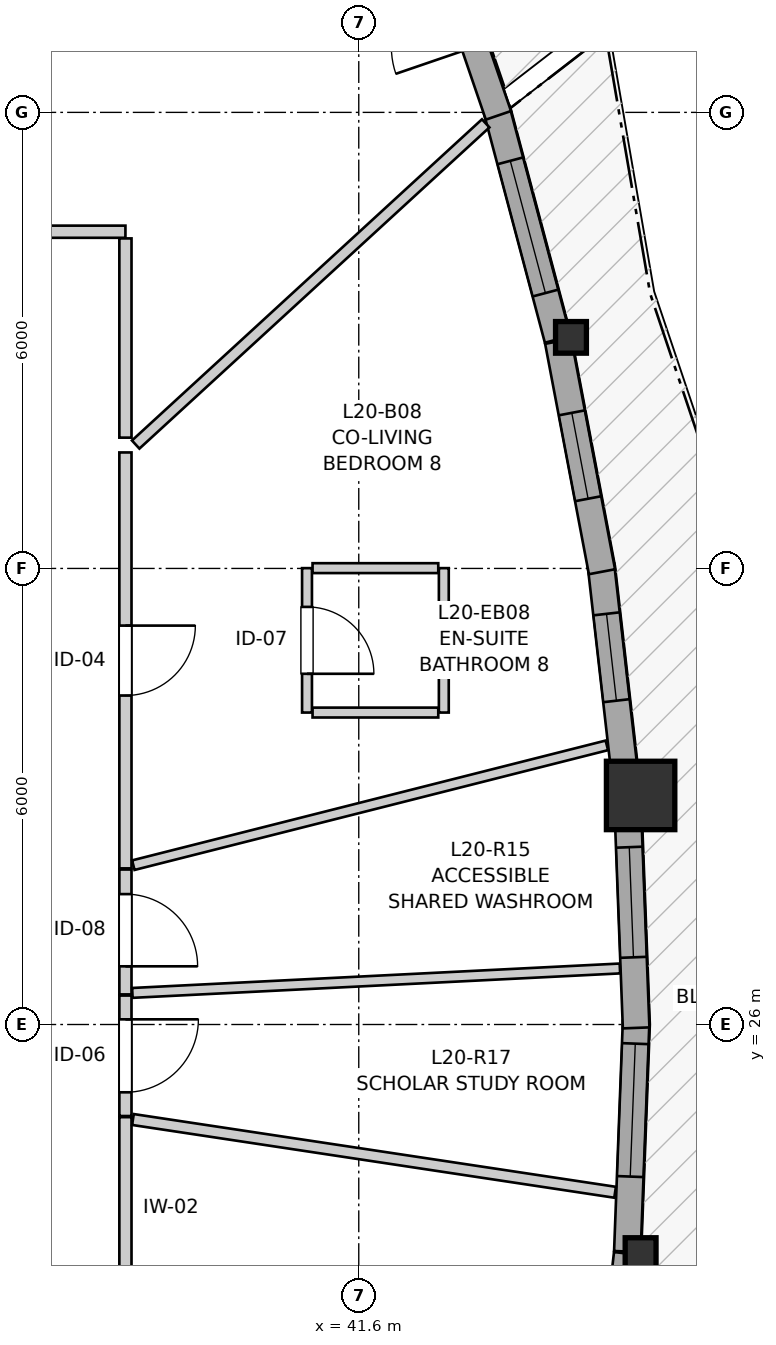
"""IFC4 building model, lengths in metres.
Left out: names, types, materials, properties, quantities, classifications, styles, units other than length and angle.
Written with IfcOpenShell. Run it as: python <this file> out.ifc"""

import sys

from ifc_helpers import new_model, si_unit, direction, frame, frame_2d, origin, origin_2d, place, context, subcontext, project, spatial, rectangle, i_section, extrude, source, transform, mapped, element, fill, save


model = new_model("IFC4")
c1 = context("Model", 3, precision=1e-05, world=origin(), true_north=direction((0.0, 1.0)))
c2 = subcontext(c1, "Body", "Model", "MODEL_VIEW")
j1 = project(units=[si_unit("LENGTHUNIT", "METRE"), si_unit("PLANEANGLEUNIT", "RADIAN")], contexts=[c1])
p1 = place(None, origin())
s1 = spatial("IfcSite", under=j1, at=p1, CompositionType="ELEMENT")
p2 = place(p1, origin())
s2 = spatial("IfcBuilding", under=s1, at=p2, CompositionType="ELEMENT")
p3 = place(p2, frame((0.0, 0.0, 70.4)))
s3 = spatial("IfcBuildingStorey", under=s2, at=p3, CompositionType="ELEMENT", Elevation=70.4)
m1 = source(origin(), c2, "Body", "SweptSolid", [
    extrude(i_section(OverallWidth=0.406, OverallDepth=0.416, WebThickness=0.027, FlangeThickness=0.044, FilletRadius=0.015, at=origin_2d()), origin(), (0.0, 0.0, 1.0), 2.95),
])
p4 = place(p3, frame((45.308, 22.987, 0.0), z_axis=(0.0, 0.0, 1.0), x_axis=(1.0, 0.0, 0.0)))
e1 = element("IfcColumn", 1, at=p4, inside=s3, PredefinedType="PILASTER", context=c2, shape_type="MappedRepresentation", body=[
    mapped(m1, transform((0.0, 0.0, 0.0), x_axis=(1.0, 0.0, 0.0), y_axis=(0.0, 1.0, 0.0), z_axis=(0.0, 0.0, 1.0), scale=1.0)),
])
m2 = source(origin(), c2, "Body", "SweptSolid", [
    extrude(rectangle(XDim=0.9, YDim=0.9, at=origin_2d()), origin(), (0.0, 0.0, 1.0), 2.95),
])
p5 = place(p3, frame((45.308, 29.013, 0.0), z_axis=(0.0, 0.0, 1.0), x_axis=(1.0, 0.0, 0.0)))
e2 = element("IfcColumn", 2, at=p5, inside=s3, PredefinedType="COLUMN", context=c2, shape_type="MappedRepresentation", body=[
    mapped(m2, transform((0.0, 0.0, 0.0), x_axis=(1.0, 0.0, 0.0), y_axis=(0.0, 1.0, 0.0), z_axis=(0.0, 0.0, 1.0), scale=1.0)),
])
p6 = place(p3, frame((44.392, 35.04, 0.0), z_axis=(0.0, 0.0, 1.0), x_axis=(1.0, 0.0, 0.0)))
e3 = element("IfcColumn", 3, at=p6, inside=s3, PredefinedType="PILASTER", context=c2, shape_type="MappedRepresentation", body=[
    mapped(m1, transform((0.0, 0.0, 0.0), x_axis=(1.0, 0.0, 0.0), y_axis=(0.0, 1.0, 0.0), z_axis=(0.0, 0.0, 1.0), scale=1.0)),
])
p7 = place(p3, frame((44.787, 19.955, 0.0), z_axis=(0.0, 0.0, 1.0), x_axis=(0.113232876367, 0.993568475602, 0.0)))
e4 = element("IfcWall", 4, at=p7, inside=s3, PredefinedType="SOLIDWALL", context=c2, shape_type="SweptSolid", body=[
    extrude(rectangle(XDim=3.051, YDim=0.35, at=frame_2d((1.525, 0.0))), origin(), (0.0, 0.0, 1.0), 2.48),
])
p8 = place(p7, frame((1.06, 0.0, 0.82)))
e5 = element("IfcOpeningElement", 5, at=p8, cuts=e4, PredefinedType="OPENING", context=c2, shape_type="SweptSolid", body=[
    extrude(rectangle(XDim=0.95, YDim=1.35, at=frame_2d((0.475, 0.675))), frame((0.0, 0.185, 0.0), z_axis=(0.0, -1.0, 0.0), x_axis=(1.0, 0.0, 0.0)), (0.0, 0.0, 1.0), 0.37),
])
p9 = place(p3, frame((45.134, 23.013, 0.0), z_axis=(0.0, 0.0, 1.0), x_axis=(0.037984969205, 0.999278310639, 0.0)))
e6 = element("IfcWall", 6, at=p9, inside=s3, PredefinedType="SOLIDWALL", context=c2, shape_type="SweptSolid", body=[
    extrude(rectangle(XDim=3.034, YDim=0.35, at=frame_2d((1.517, 0.0))), origin(), (0.0, 0.0, 1.0), 2.48),
])
p10 = place(p9, frame((0.987, 0.0, 0.82)))
e7 = element("IfcOpeningElement", 7, at=p10, cuts=e6, PredefinedType="OPENING", context=c2, shape_type="SweptSolid", body=[
    extrude(rectangle(XDim=1.75, YDim=1.3, at=frame_2d((0.875, 0.65))), frame((0.0, 0.185, 0.0), z_axis=(0.0, -1.0, 0.0), x_axis=(1.0, 0.0, 0.0)), (0.0, 0.0, 1.0), 0.37),
])
p11 = place(p3, frame((45.249, 25.955, 0.0), z_axis=(0.0, 0.0, 1.0), x_axis=(-0.0379756963, 0.999278663082, 0.0)))
e8 = element("IfcWall", 8, at=p11, inside=s3, PredefinedType="SOLIDWALL", context=c2, shape_type="SweptSolid", body=[
    extrude(rectangle(XDim=2.829, YDim=0.35, at=frame_2d((1.414, 0.0))), origin(), (0.0, 0.0, 1.0), 2.48),
])
p12 = place(p11, frame((0.929, 0.0, 0.82)))
e9 = element("IfcOpeningElement", 9, at=p12, cuts=e8, PredefinedType="OPENING", context=c2, shape_type="SweptSolid", body=[
    extrude(rectangle(XDim=1.45, YDim=1.25, at=frame_2d((0.725, 0.625))), frame((0.0, 0.185, 0.0), z_axis=(0.0, -1.0, 0.0), x_axis=(1.0, 0.0, 0.0)), (0.0, 0.0, 1.0), 0.37),
])
p13 = place(p3, frame((45.109, 29.217, 0.0), z_axis=(0.0, 0.0, 1.0), x_axis=(-0.11323690057, 0.993568016972, 0.0)))
e10 = element("IfcWall", 10, at=p13, inside=s3, PredefinedType="SOLIDWALL", context=c2, shape_type="SweptSolid", body=[
    extrude(rectangle(XDim=2.846, YDim=0.35, at=frame_2d((1.423, 0.0))), origin(), (0.0, 0.0, 1.0), 2.48),
])
p14 = place(p13, frame((1.05, 0.0, 0.82)))
e11 = element("IfcOpeningElement", 11, at=p14, cuts=e10, PredefinedType="OPENING", context=c2, shape_type="SweptSolid", body=[
    extrude(rectangle(XDim=1.15, YDim=1.2, at=frame_2d((0.575, 0.6))), frame((0.0, 0.185, 0.0), z_axis=(0.0, -1.0, 0.0), x_axis=(1.0, 0.0, 0.0)), (0.0, 0.0, 1.0), 0.37),
])
p15 = place(p3, frame((44.8, 31.957, 0.0), z_axis=(0.0, 0.0, 1.0), x_axis=(-0.186672102023, 0.982422274954, 0.0)))
e12 = element("IfcWall", 12, at=p15, inside=s3, PredefinedType="SOLIDWALL", context=c2, shape_type="SweptSolid", body=[
    extrude(rectangle(XDim=3.085, YDim=0.35, at=frame_2d((1.542, 0.0))), origin(), (0.0, 0.0, 1.0), 2.48),
])
p16 = place(p15, frame((0.978, 0.0, 0.82)))
e13 = element("IfcOpeningElement", 13, at=p16, cuts=e12, PredefinedType="OPENING", context=c2, shape_type="SweptSolid", body=[
    extrude(rectangle(XDim=1.15, YDim=1.2, at=frame_2d((0.575, 0.6))), frame((0.0, 0.185, 0.0), z_axis=(0.0, -1.0, 0.0), x_axis=(1.0, 0.0, 0.0)), (0.0, 0.0, 1.0), 0.37),
])
p17 = place(p3, frame((44.218, 35.014, 0.0), z_axis=(0.0, 0.0, 1.0), x_axis=(-0.25705209467, 0.96639754792, 0.0)))
e14 = element("IfcWall", 14, at=p17, inside=s3, PredefinedType="SOLIDWALL", context=c2, shape_type="SweptSolid", body=[
    extrude(rectangle(XDim=3.136, YDim=0.35, at=frame_2d((1.568, 0.0))), origin(), (0.0, 0.0, 1.0), 2.48),
])
p18 = place(p17, frame((0.63, 0.0, 0.82)))
e15 = element("IfcOpeningElement", 15, at=p18, cuts=e14, PredefinedType="OPENING", context=c2, shape_type="SweptSolid", body=[
    extrude(rectangle(XDim=1.8, YDim=1.45, at=frame_2d((0.9, 0.725))), frame((0.0, 0.185, 0.0), z_axis=(0.0, -1.0, 0.0), x_axis=(1.0, 0.0, 0.0)), (0.0, 0.0, 1.0), 0.37),
])
p19 = place(p3, frame((43.437, 37.961, 0.0), z_axis=(0.0, 0.0, 1.0), x_axis=(-0.323572555921, 0.946203361363, 0.0)))
e16 = element("IfcWall", 16, at=p19, inside=s3, PredefinedType="SOLIDWALL", context=c2, shape_type="SweptSolid", body=[
    extrude(rectangle(XDim=2.998, YDim=0.35, at=frame_2d((1.499, 0.0))), origin(), (0.0, 0.0, 1.0), 2.48),
])
p20 = place(p19, frame((0.954, 0.0, 0.0)))
e17 = element("IfcOpeningElement", 17, at=p20, cuts=e16, PredefinedType="OPENING", context=c2, shape_type="SweptSolid", body=[
    extrude(rectangle(XDim=1.1, YDim=2.1, at=frame_2d((0.55, 1.05))), frame((0.0, 0.185, 0.0), z_axis=(0.0, -1.0, 0.0), x_axis=(1.0, 0.0, 0.0)), (0.0, 0.0, 1.0), 0.37),
])
p21 = place(p3, frame((38.53, 24.781, 0.0), z_axis=(0.0, 0.0, 1.0), x_axis=(0.0, -1.0, 0.0)))
e18 = element("IfcWall", 18, at=p21, inside=s3, PredefinedType="PARTITIONING", context=c2, shape_type="SweptSolid", body=[
    extrude(rectangle(XDim=7.203, YDim=0.16, at=frame_2d((3.602, 0.0))), origin(), (0.0, 0.0, 1.0), 2.95),
])
p22 = place(p21, frame((3.119, 0.0, 0.0)))
e19 = element("IfcOpeningElement", 19, at=p22, cuts=e18, PredefinedType="OPENING", context=c2, shape_type="SweptSolid", body=[
    extrude(rectangle(XDim=0.96, YDim=2.1, at=frame_2d((0.48, 1.05))), frame((0.0, 0.09, 0.0), z_axis=(0.0, -1.0, 0.0), x_axis=(1.0, 0.0, 0.0)), (0.0, 0.0, 1.0), 0.18),
])
p23 = place(p3, frame((38.53, 33.526, 0.0), z_axis=(0.0, 0.0, 1.0), x_axis=(0.0, -1.0, 0.0)))
e20 = element("IfcWall", 20, at=p23, inside=s3, PredefinedType="PARTITIONING", context=c2, shape_type="SweptSolid", body=[
    extrude(rectangle(XDim=5.472, YDim=0.16, at=frame_2d((2.736, 0.0))), origin(), (0.0, 0.0, 1.0), 2.95),
])
p24 = place(p23, frame((2.278, 0.0, 0.0)))
e21 = element("IfcOpeningElement", 21, at=p24, cuts=e20, PredefinedType="OPENING", context=c2, shape_type="SweptSolid", body=[
    extrude(rectangle(XDim=0.92, YDim=2.1, at=frame_2d((0.46, 1.05))), frame((0.0, 0.09, 0.0), z_axis=(0.0, -1.0, 0.0), x_axis=(1.0, 0.0, 0.0)), (0.0, 0.0, 1.0), 0.18),
])
p25 = place(p3, frame((34.909, 36.43, 0.0), z_axis=(0.0, 0.0, 1.0), x_axis=(1.0, 0.0, 0.0)))
e22 = element("IfcWall", 22, at=p25, inside=s3, PredefinedType="PARTITIONING", context=c2, shape_type="SweptSolid", body=[
    extrude(rectangle(XDim=3.621, YDim=0.16, at=frame_2d((1.811, 0.0))), origin(), (0.0, 0.0, 1.0), 2.588),
])
p26 = place(p25, frame((1.339, 0.0, 0.0)))
e23 = element("IfcOpeningElement", 23, at=p26, cuts=e22, PredefinedType="OPENING", context=c2, shape_type="SweptSolid", body=[
    extrude(rectangle(XDim=0.96, YDim=2.1, at=frame_2d((0.48, 1.05))), frame((0.0, 0.09, 0.0), z_axis=(0.0, -1.0, 0.0), x_axis=(1.0, 0.0, 0.0)), (0.0, 0.0, 1.0), 0.18),
])
p27 = place(p3, frame((40.919, 32.004, 0.0), z_axis=(0.0, 0.0, 1.0), x_axis=(0.0, -1.0, 0.0)))
e24 = element("IfcWall", 24, at=p27, inside=s3, PredefinedType="PARTITIONING", context=c2, shape_type="SweptSolid", body=[
    extrude(rectangle(XDim=1.9, YDim=0.13, at=frame_2d((0.95, 0.0))), origin(), (0.0, 0.0, 1.0), 2.95),
])
p28 = place(p27, frame((0.51, 0.0, 0.0)))
e25 = element("IfcOpeningElement", 25, at=p28, cuts=e24, PredefinedType="OPENING", context=c2, shape_type="SweptSolid", body=[
    extrude(rectangle(XDim=0.88, YDim=2.05, at=frame_2d((0.44, 1.025))), frame((0.0, 0.075, 0.0), z_axis=(0.0, -1.0, 0.0), x_axis=(1.0, 0.0, 0.0)), (0.0, 0.0, 1.0), 0.15),
])
p29 = place(p3, frame((38.53, 28.039, 0.0), z_axis=(0.0, 0.0, 1.0), x_axis=(0.0, -1.0, 0.0)))
e26 = element("IfcWall", 26, at=p29, inside=s3, PredefinedType="PARTITIONING", context=c2, shape_type="SweptSolid", body=[
    extrude(rectangle(XDim=1.643, YDim=0.16, at=frame_2d((0.822, 0.0))), origin(), (0.0, 0.0, 1.0), 2.95),
])
p30 = place(p29, frame((0.323, 0.0, 0.0)))
e27 = element("IfcOpeningElement", 27, at=p30, cuts=e26, PredefinedType="OPENING", context=c2, shape_type="SweptSolid", body=[
    extrude(rectangle(XDim=0.95, YDim=2.1, at=frame_2d((0.475, 1.05))), frame((0.0, 0.09, 0.0), z_axis=(0.0, -1.0, 0.0), x_axis=(1.0, 0.0, 0.0)), (0.0, 0.0, 1.0), 0.18),
])
p31 = place(p3, frame((38.53, 26.381, 0.0), z_axis=(0.0, 0.0, 1.0), x_axis=(0.0, -1.0, 0.0)))
e28 = element("IfcWall", 28, at=p31, inside=s3, PredefinedType="PARTITIONING", context=c2, shape_type="SweptSolid", body=[
    extrude(rectangle(XDim=1.585, YDim=0.16, at=frame_2d((0.792, 0.0))), origin(), (0.0, 0.0, 1.0), 2.95),
])
p32 = place(p31, frame((0.313, 0.0, 0.0)))
e29 = element("IfcOpeningElement", 29, at=p32, cuts=e28, PredefinedType="OPENING", context=c2, shape_type="SweptSolid", body=[
    extrude(rectangle(XDim=0.96, YDim=2.1, at=frame_2d((0.48, 1.05))), frame((0.0, 0.09, 0.0), z_axis=(0.0, -1.0, 0.0), x_axis=(1.0, 0.0, 0.0)), (0.0, 0.0, 1.0), 0.18),
])
p33 = place(p3, frame((34.977, 36.546, 0.0), z_axis=(0.0, 0.0, 1.0), x_axis=(0.40175384449, 0.915747699117, 0.0)))
e30 = element("IfcWall", 30, at=p33, inside=s3, PredefinedType="PARTITIONING", context=c2, shape_type="SweptSolid", body=[
    extrude(rectangle(XDim=10.23, YDim=0.145, at=frame_2d((5.115, 0.0))), origin(), (0.0, 0.0, 1.0), 2.95),
])
p34 = place(p3, frame((38.634, 28.096, 0.0), z_axis=(0.0, 0.0, 1.0), x_axis=(0.969457090906, 0.245260981186, 0.0)))
e31 = element("IfcWall", 31, at=p34, inside=s3, PredefinedType="PARTITIONING", context=c2, shape_type="SweptSolid", body=[
    extrude(rectangle(XDim=6.427, YDim=0.13, at=frame_2d((3.213, 0.0))), origin(), (0.0, 0.0, 1.0), 2.95),
])
p35 = place(p3, frame((38.629, 24.75, 0.0), z_axis=(0.0, 0.0, 1.0), x_axis=(0.988806184902, -0.149205659073, 0.0)))
e32 = element("IfcWall", 32, at=p35, inside=s3, PredefinedType="PARTITIONING", context=c2, shape_type="SweptSolid", body=[
    extrude(rectangle(XDim=6.416, YDim=0.145, at=frame_2d((3.208, 0.0))), origin(), (0.0, 0.0, 1.0), 2.95),
])
p36 = place(p3, frame((38.621, 26.416, 0.0), z_axis=(0.0, 0.0, 1.0), x_axis=(0.998746074583, 0.050062745689, 0.0)))
e33 = element("IfcWall", 33, at=p36, inside=s3, PredefinedType="PARTITIONING", context=c2, shape_type="SweptSolid", body=[
    extrude(rectangle(XDim=6.423, YDim=0.13, at=frame_2d((3.211, 0.0))), origin(), (0.0, 0.0, 1.0), 2.95),
])
p37 = place(p3, frame((38.665, 33.63, 0.0), z_axis=(0.0, 0.0, 1.0), x_axis=(0.736824900837, 0.676083623161, 0.0)))
e34 = element("IfcWall", 34, at=p37, inside=s3, PredefinedType="PARTITIONING", context=c2, shape_type="SweptSolid", body=[
    extrude(rectangle(XDim=6.25, YDim=0.145, at=frame_2d((3.125, 0.0))), origin(), (0.0, 0.0, 1.0), 2.95),
])
p38 = place(p3, frame((38.53, 33.721, 0.0), z_axis=(0.0, 0.0, 1.0), x_axis=(0.0, 1.0, 0.0)))
e35 = element("IfcWall", 35, at=p38, inside=s3, PredefinedType="PARTITIONING", context=c2, shape_type="SweptSolid", body=[
    extrude(rectangle(XDim=2.621, YDim=0.16, at=frame_2d((1.311, 0.0))), origin(), (0.0, 0.0, 1.0), 2.588),
])
p39 = place(p3, frame((42.719, 30.104, 0.0), z_axis=(0.0, 0.0, 1.0), x_axis=(0.0, 1.0, 0.0)))
e36 = element("IfcWall", 36, at=p39, inside=s3, PredefinedType="PARTITIONING", context=c2, shape_type="SweptSolid", body=[
    extrude(rectangle(XDim=1.9, YDim=0.13, at=frame_2d((0.95, 0.0))), origin(), (0.0, 0.0, 1.0), 2.95),
])
for number, where, z_axis, x_axis in (
    (37, (40.992, 32.004, 0.0), (0.0, 0.0, 1.0), (1.0, 0.0, 0.0)),
    (38, (40.992, 30.104, 0.0), (0.0, 0.0, 1.0), (1.0, 0.0, 0.0)),
):
    element("IfcWall", number, at=place(p3, frame(where, z_axis=z_axis, x_axis=x_axis)), inside=s3, PredefinedType="PARTITIONING", context=c2, shape_type="SweptSolid", body=[
        extrude(rectangle(XDim=1.654, YDim=0.13, at=frame_2d((0.827, 0.0))), origin(), (0.0, 0.0, 1.0), 2.95),
    ])
m3 = source(origin(), c2, "Body", "SweptSolid", [
    extrude(rectangle(XDim=1.75, YDim=1.3, at=frame_2d((0.875, 0.65))), frame((0.0, 0.03, 0.0), z_axis=(0.0, -1.0, 0.0), x_axis=(1.0, 0.0, 0.0)), (0.0, 0.0, 1.0), 0.06),
])
p40 = place(p10, origin())
e39 = element("IfcWindow", 39, at=p40, inside=s3, PartitioningType="SINGLE_PANEL", PredefinedType="WINDOW", context=c2, shape_type="MappedRepresentation", body=[
    mapped(m3, transform((0.0, 0.0, 0.0), x_axis=(1.0, 0.0, 0.0), y_axis=(0.0, 1.0, 0.0), z_axis=(0.0, 0.0, 1.0), scale=1.0)),
])
fill(e7, e39)
m4 = source(origin(), c2, "Body", "SweptSolid", [
    extrude(rectangle(XDim=1.45, YDim=1.25, at=frame_2d((0.725, 0.625))), frame((0.0, 0.03, 0.0), z_axis=(0.0, -1.0, 0.0), x_axis=(1.0, 0.0, 0.0)), (0.0, 0.0, 1.0), 0.06),
])
p41 = place(p12, origin())
e40 = element("IfcWindow", 40, at=p41, inside=s3, PartitioningType="SINGLE_PANEL", PredefinedType="WINDOW", context=c2, shape_type="MappedRepresentation", body=[
    mapped(m4, transform((0.0, 0.0, 0.0), x_axis=(1.0, 0.0, 0.0), y_axis=(0.0, 1.0, 0.0), z_axis=(0.0, 0.0, 1.0), scale=1.0)),
])
fill(e9, e40)
m5 = source(origin(), c2, "Body", "SweptSolid", [
    extrude(rectangle(XDim=1.15, YDim=1.2, at=frame_2d((0.575, 0.6))), frame((0.0, 0.03, 0.0), z_axis=(0.0, -1.0, 0.0), x_axis=(1.0, 0.0, 0.0)), (0.0, 0.0, 1.0), 0.06),
])
p42 = place(p14, origin())
e41 = element("IfcWindow", 41, at=p42, inside=s3, PartitioningType="SINGLE_PANEL", PredefinedType="WINDOW", context=c2, shape_type="MappedRepresentation", body=[
    mapped(m5, transform((0.0, 0.0, 0.0), x_axis=(1.0, 0.0, 0.0), y_axis=(0.0, 1.0, 0.0), z_axis=(0.0, 0.0, 1.0), scale=1.0)),
])
fill(e11, e41)
p43 = place(p16, origin())
e42 = element("IfcWindow", 42, at=p43, inside=s3, PartitioningType="SINGLE_PANEL", PredefinedType="WINDOW", context=c2, shape_type="MappedRepresentation", body=[
    mapped(m5, transform((0.0, 0.0, 0.0), x_axis=(1.0, 0.0, 0.0), y_axis=(0.0, 1.0, 0.0), z_axis=(0.0, 0.0, 1.0), scale=1.0)),
])
fill(e13, e42)
m6 = source(origin(), c2, "Body", "SweptSolid", [
    extrude(rectangle(XDim=1.8, YDim=1.45, at=frame_2d((0.9, 0.725))), frame((0.0, 0.03, 0.0), z_axis=(0.0, -1.0, 0.0), x_axis=(1.0, 0.0, 0.0)), (0.0, 0.0, 1.0), 0.06),
])
p44 = place(p18, origin())
e43 = element("IfcWindow", 43, at=p44, inside=s3, PartitioningType="SINGLE_PANEL", PredefinedType="WINDOW", context=c2, shape_type="MappedRepresentation", body=[
    mapped(m6, transform((0.0, 0.0, 0.0), x_axis=(1.0, 0.0, 0.0), y_axis=(0.0, 1.0, 0.0), z_axis=(0.0, 0.0, 1.0), scale=1.0)),
])
fill(e15, e43)
m7 = source(origin(), c2, "Body", "SweptSolid", [
    extrude(rectangle(XDim=0.92, YDim=2.1, at=frame_2d((0.46, 1.05))), frame((0.0, 0.025, 0.0), z_axis=(0.0, -1.0, 0.0), x_axis=(1.0, 0.0, 0.0)), (0.0, 0.0, 1.0), 0.05),
])
p45 = place(p24, origin())
e44 = element("IfcDoor", 44, at=p45, inside=s3, OperationType="SINGLE_SWING_LEFT", PredefinedType="DOOR", context=c2, shape_type="MappedRepresentation", body=[
    mapped(m7, transform((0.0, 0.0, 0.0), x_axis=(1.0, 0.0, 0.0), y_axis=(0.0, 1.0, 0.0), z_axis=(0.0, 0.0, 1.0), scale=1.0)),
])
fill(e21, e44)
m8 = source(origin(), c2, "Body", "SweptSolid", [
    extrude(rectangle(XDim=0.88, YDim=2.05, at=frame_2d((0.44, 1.025))), frame((0.0, 0.025, 0.0), z_axis=(0.0, -1.0, 0.0), x_axis=(1.0, 0.0, 0.0)), (0.0, 0.0, 1.0), 0.05),
])
p46 = place(p28, origin())
e45 = element("IfcDoor", 45, at=p46, inside=s3, OperationType="SINGLE_SWING_RIGHT", PredefinedType="DOOR", context=c2, shape_type="MappedRepresentation", body=[
    mapped(m8, transform((0.0, 0.0, 0.0), x_axis=(1.0, 0.0, 0.0), y_axis=(0.0, 1.0, 0.0), z_axis=(0.0, 0.0, 1.0), scale=1.0)),
])
fill(e25, e45)
m9 = source(origin(), c2, "Body", "SweptSolid", [
    extrude(rectangle(XDim=0.95, YDim=2.1, at=frame_2d((0.475, 1.05))), frame((0.0, 0.025, 0.0), z_axis=(0.0, -1.0, 0.0), x_axis=(1.0, 0.0, 0.0)), (0.0, 0.0, 1.0), 0.05),
])
p47 = place(p30, origin())
e46 = element("IfcDoor", 46, at=p47, inside=s3, OperationType="SINGLE_SWING_RIGHT", PredefinedType="DOOR", context=c2, shape_type="MappedRepresentation", body=[
    mapped(m9, transform((0.0, 0.0, 0.0), x_axis=(1.0, 0.0, 0.0), y_axis=(0.0, 1.0, 0.0), z_axis=(0.0, 0.0, 1.0), scale=1.0)),
])
fill(e27, e46)
m10 = source(origin(), c2, "Body", "SweptSolid", [
    extrude(rectangle(XDim=0.96, YDim=2.1, at=frame_2d((0.48, 1.05))), frame((0.0, 0.025, 0.0), z_axis=(0.0, -1.0, 0.0), x_axis=(1.0, 0.0, 0.0)), (0.0, 0.0, 1.0), 0.05),
])
p48 = place(p32, origin())
e47 = element("IfcDoor", 47, at=p48, inside=s3, OperationType="SINGLE_SWING_LEFT", PredefinedType="DOOR", context=c2, shape_type="MappedRepresentation", body=[
    mapped(m10, transform((0.0, 0.0, 0.0), x_axis=(1.0, 0.0, 0.0), y_axis=(0.0, 1.0, 0.0), z_axis=(0.0, 0.0, 1.0), scale=1.0)),
])
fill(e29, e47)
save(model, sys.argv[1])
